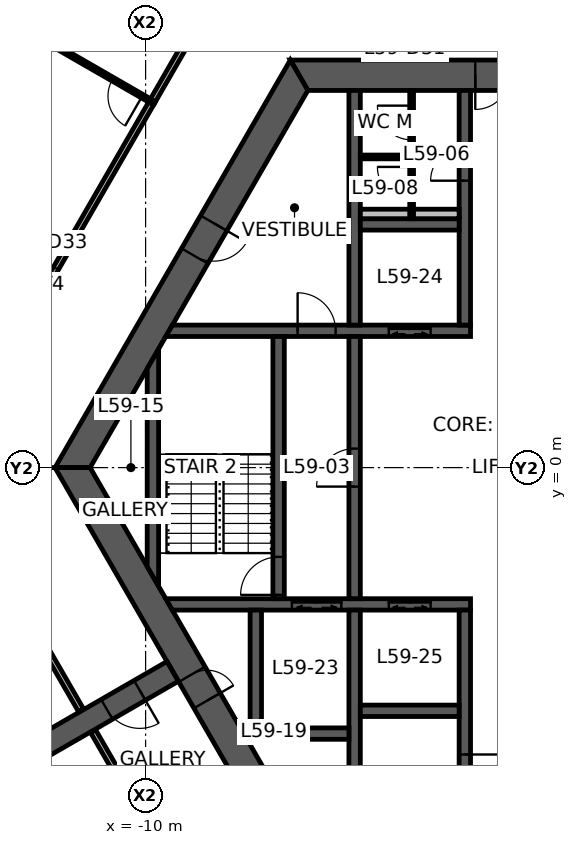
"""IFC4 building model, lengths in metres.
Left out: names, types, materials, properties, quantities, classifications, styles, units other than length and angle.
Written with IfcOpenShell. Run it as: python <this file> out.ifc"""

import sys

from ifc_helpers import new_model, si_unit, direction, frame, frame_2d, origin, place, context, subcontext, project, spatial, polyline, rectangle, outline, extrude, element, fill, save


model = new_model("IFC4")
c1 = context("Model", 3, precision=1e-05, world=origin(), true_north=direction((0.0, 1.0)))
c2 = subcontext(c1, "Body", "Model", "MODEL_VIEW")
j1 = project(units=[si_unit("LENGTHUNIT", "METRE"), si_unit("PLANEANGLEUNIT", "RADIAN")], contexts=[c1])
p1 = place(None, origin())
s1 = spatial("IfcSite", under=j1, at=p1, CompositionType="ELEMENT")
p2 = place(p1, origin())
s2 = spatial("IfcBuilding", under=s1, at=p2, CompositionType="ELEMENT")
p3 = place(p2, frame((0.0, 0.0, 236.2)))
s3 = spatial("IfcBuildingStorey", under=s2, at=p3, CompositionType="ELEMENT", Elevation=236.2)
p4 = place(p3, frame((5.961, 10.325, 0.0), z_axis=(0.0, 0.0, 1.0), x_axis=(-1.0, 0.0, 0.0)))
e1 = element("IfcWall", 1, at=p4, inside=s3, PredefinedType="SHEAR", context=c2, shape_type="SweptSolid", body=[
    extrude(outline(polyline([(-0.231, -0.4), (4.636, -0.4), (5.536, -0.4), (6.386, -0.4), (7.286, -0.4), (12.153, -0.4), (11.691, 0.4), (7.286, 0.4), (6.386, 0.4), (5.536, 0.4), (4.636, 0.4), (0.231, 0.4), (-0.231, -0.4)])), origin(), (0.0, 0.0, 1.0), 3.9),
])
p5 = place(p4, frame((6.386, 0.0, 0.0)))
e2 = element("IfcOpeningElement", 2, at=p5, cuts=e1, PredefinedType="OPENING", context=c2, shape_type="SweptSolid", body=[
    extrude(rectangle(XDim=0.9, YDim=2.1, at=frame_2d((0.45, 1.05))), frame((0.0, 0.41, 0.0), z_axis=(0.0, -1.0, 0.0), x_axis=(1.0, 0.0, 0.0)), (0.0, 0.0, 1.0), 0.82),
])
p6 = place(p4, frame((4.636, 0.0, 0.0)))
e3 = element("IfcOpeningElement", 3, at=p6, cuts=e1, PredefinedType="OPENING", context=c2, shape_type="SweptSolid", body=[
    extrude(rectangle(XDim=0.9, YDim=2.1, at=frame_2d((0.45, 1.05))), frame((0.0, 0.41, 0.0), z_axis=(0.0, -1.0, 0.0), x_axis=(1.0, 0.0, 0.0)), (0.0, 0.0, 1.0), 0.82),
])
p7 = place(p3, frame((-5.961, 10.325, 0.0), z_axis=(0.0, 0.0, 1.0), x_axis=(-0.500004296715, -0.866022923061, 0.0)))
e4 = element("IfcWall", 4, at=p7, inside=s3, PredefinedType="SHEAR", context=c2, shape_type="SweptSolid", body=[
    extrude(outline(polyline([(-0.231, -0.4), (4.494, -0.4), (5.494, -0.4), (12.153, -0.4), (11.691, 0.4), (5.494, 0.4), (4.494, 0.4), (0.231, 0.4), (-0.231, -0.4)])), origin(), (0.0, 0.0, 1.0), 3.9),
])
p8 = place(p7, frame((4.494, 0.0, 0.0)))
e5 = element("IfcOpeningElement", 5, at=p8, cuts=e4, PredefinedType="OPENING", context=c2, shape_type="SweptSolid", body=[
    extrude(rectangle(XDim=1.0, YDim=2.1, at=frame_2d((0.5, 1.05))), frame((0.0, 0.41, 0.0), z_axis=(0.0, -1.0, 0.0), x_axis=(1.0, 0.0, 0.0)), (0.0, 0.0, 1.0), 0.82),
])
p9 = place(p3, frame((-11.922, 0.0, 0.0), z_axis=(0.0, 0.0, 1.0), x_axis=(0.500004296715, -0.866022923061, 0.0)))
e6 = element("IfcWall", 6, at=p9, inside=s3, PredefinedType="SHEAR", context=c2, shape_type="SweptSolid", body=[
    extrude(outline(polyline([(-0.231, -0.4), (6.281, -0.4), (7.081, -0.4), (12.153, -0.4), (11.691, 0.4), (7.081, 0.4), (6.281, 0.4), (0.231, 0.4), (-0.231, -0.4)])), origin(), (0.0, 0.0, 1.0), 3.9),
])
p10 = place(p9, frame((6.281, 0.0, 0.0)))
e7 = element("IfcOpeningElement", 7, at=p10, cuts=e6, PredefinedType="OPENING", context=c2, shape_type="SweptSolid", body=[
    extrude(rectangle(XDim=0.8, YDim=2.1, at=frame_2d((0.4, 1.05))), frame((0.0, 0.41, 0.0), z_axis=(0.0, -1.0, 0.0), x_axis=(1.0, 0.0, 0.0)), (0.0, 0.0, 1.0), 0.82),
])
p11 = place(p3, frame((-9.288, -5.363, 0.0), z_axis=(0.0, 0.0, 1.0), x_axis=(-0.866027473358, -0.499996415376, 0.0)))
e8 = element("IfcWall", 8, at=p11, inside=s3, PredefinedType="SHEAR", context=c2, shape_type="SweptSolid", body=[
    extrude(rectangle(XDim=7.045, YDim=0.6, at=frame_2d((3.523, 0.0))), origin(), (0.0, 0.0, 1.0), 3.9),
])
p12 = place(p11, frame((1.0, 0.0, 0.0)))
e9 = element("IfcOpeningElement", 9, at=p12, cuts=e8, PredefinedType="OPENING", context=c2, shape_type="SweptSolid", body=[
    extrude(rectangle(XDim=1.0, YDim=2.1, at=frame_2d((0.5, 1.05))), frame((0.0, 0.31, 0.0), z_axis=(0.0, -1.0, 0.0), x_axis=(1.0, 0.0, 0.0)), (0.0, 0.0, 1.0), 0.62),
])
p13 = place(p3, frame((-9.382, 3.6, 0.0), z_axis=(0.0, 0.0, 1.0), x_axis=(1.0, 0.0, 0.0)))
e10 = element("IfcWall", 10, at=p13, inside=s3, PredefinedType="SHEAR", context=c2, shape_type="SweptSolid", body=[
    extrude(outline(polyline([(-0.087, -0.15), (3.382, -0.15), (4.382, -0.15), (5.782, -0.15), (6.882, -0.15), (7.932, -0.15), (7.932, 0.15), (6.882, 0.15), (5.782, 0.15), (4.382, 0.15), (3.382, 0.15), (0.087, 0.15), (-0.087, -0.15)])), origin(), (0.0, 0.0, 1.0), 3.9),
])
p14 = place(p13, frame((3.382, 0.0, 0.0)))
e11 = element("IfcOpeningElement", 11, at=p14, cuts=e10, PredefinedType="OPENING", context=c2, shape_type="SweptSolid", body=[
    extrude(rectangle(XDim=1.0, YDim=2.1, at=frame_2d((0.5, 1.05))), frame((0.0, 0.16, 0.0), z_axis=(0.0, -1.0, 0.0), x_axis=(1.0, 0.0, 0.0)), (0.0, 0.0, 1.0), 0.32),
])
p15 = place(p13, frame((5.782, 0.0, 0.0)))
e12 = element("IfcOpeningElement", 12, at=p15, cuts=e10, PredefinedType="OPENING", context=c2, shape_type="SweptSolid", body=[
    extrude(rectangle(XDim=1.1, YDim=2.1, at=frame_2d((0.55, 1.05))), frame((0.0, 0.16, 0.0), z_axis=(0.0, -1.0, 0.0), x_axis=(1.0, 0.0, 0.0)), (0.0, 0.0, 1.0), 0.32),
])
p16 = place(p3, frame((-9.382, -3.6, 0.0), z_axis=(0.0, 0.0, 1.0), x_axis=(1.0, 0.0, 0.0)))
e13 = element("IfcWall", 13, at=p16, inside=s3, PredefinedType="SHEAR", context=c2, shape_type="SweptSolid", body=[
    extrude(outline(polyline([(0.087, -0.15), (3.232, -0.15), (4.532, -0.15), (5.782, -0.15), (6.882, -0.15), (7.932, -0.15), (7.932, 0.15), (6.882, 0.15), (5.782, 0.15), (4.532, 0.15), (3.232, 0.15), (-0.087, 0.15), (0.087, -0.15)])), origin(), (0.0, 0.0, 1.0), 3.9),
])
p17 = place(p16, frame((5.782, 0.0, 0.0)))
e14 = element("IfcOpeningElement", 14, at=p17, cuts=e13, PredefinedType="OPENING", context=c2, shape_type="SweptSolid", body=[
    extrude(rectangle(XDim=1.1, YDim=2.1, at=frame_2d((0.55, 1.05))), frame((0.0, 0.16, 0.0), z_axis=(0.0, -1.0, 0.0), x_axis=(1.0, 0.0, 0.0)), (0.0, 0.0, 1.0), 0.32),
])
p18 = place(p16, frame((3.232, 0.0, 0.0)))
e15 = element("IfcOpeningElement", 15, at=p18, cuts=e13, PredefinedType="OPENING", context=c2, shape_type="SweptSolid", body=[
    extrude(rectangle(XDim=1.3, YDim=2.1, at=frame_2d((0.65, 1.05))), frame((0.0, 0.16, 0.0), z_axis=(0.0, -1.0, 0.0), x_axis=(1.0, 0.0, 0.0)), (0.0, 0.0, 1.0), 0.32),
])
p19 = place(p3, frame((-1.6, 3.75, 0.0), z_axis=(0.0, 0.0, 1.0), x_axis=(0.0, 1.0, 0.0)))
e16 = element("IfcWall", 16, at=p19, inside=s3, PredefinedType="SHEAR", context=c2, shape_type="SweptSolid", body=[
    extrude(rectangle(XDim=6.175, YDim=0.3, at=frame_2d((3.087, 0.0))), origin(), (0.0, 0.0, 1.0), 3.9),
])
p20 = place(p19, frame((3.8, 0.0, 0.0)))
e17 = element("IfcOpeningElement", 17, at=p20, cuts=e16, PredefinedType="OPENING", context=c2, shape_type="SweptSolid", body=[
    extrude(rectangle(XDim=0.9, YDim=2.1, at=frame_2d((0.45, 1.05))), frame((0.0, 0.16, 0.0), z_axis=(0.0, -1.0, 0.0), x_axis=(1.0, 0.0, 0.0)), (0.0, 0.0, 1.0), 0.32),
])
p21 = place(p3, frame((-1.6, -3.75, 0.0), z_axis=(0.0, 0.0, 1.0), x_axis=(0.0, -1.0, 0.0)))
e18 = element("IfcWall", 18, at=p21, inside=s3, PredefinedType="SHEAR", context=c2, shape_type="SweptSolid", body=[
    extrude(rectangle(XDim=6.175, YDim=0.3, at=frame_2d((3.087, 0.0))), origin(), (0.0, 0.0, 1.0), 3.9),
])
p22 = place(p21, frame((3.8, 0.0, 0.0)))
e19 = element("IfcOpeningElement", 19, at=p22, cuts=e18, PredefinedType="OPENING", context=c2, shape_type="SweptSolid", body=[
    extrude(rectangle(XDim=0.9, YDim=2.1, at=frame_2d((0.45, 1.05))), frame((0.0, 0.16, 0.0), z_axis=(0.0, -1.0, 0.0), x_axis=(1.0, 0.0, 0.0)), (0.0, 0.0, 1.0), 0.32),
])
p23 = place(p3, frame((-4.5, -3.45, 0.0), z_axis=(0.0, 0.0, 1.0), x_axis=(0.0, 1.0, 0.0)))
e20 = element("IfcWall", 20, at=p23, inside=s3, PredefinedType="SHEAR", context=c2, shape_type="SweptSolid", body=[
    extrude(rectangle(XDim=6.9, YDim=0.3, at=frame_2d((3.45, 0.0))), origin(), (0.0, 0.0, 1.0), 3.9),
])
p24 = place(p23, frame((2.95, 0.0, 0.0)))
e21 = element("IfcOpeningElement", 21, at=p24, cuts=e20, PredefinedType="OPENING", context=c2, shape_type="SweptSolid", body=[
    extrude(rectangle(XDim=1.0, YDim=2.1, at=frame_2d((0.5, 1.05))), frame((0.0, 0.16, 0.0), z_axis=(0.0, -1.0, 0.0), x_axis=(1.0, 0.0, 0.0)), (0.0, 0.0, 1.0), 0.32),
])
p25 = place(p3, frame((-6.5, -3.45, 0.0), z_axis=(0.0, 0.0, 1.0), x_axis=(0.0, 1.0, 0.0)))
e22 = element("IfcWall", 22, at=p25, inside=s3, PredefinedType="SHEAR", context=c2, shape_type="SweptSolid", body=[
    extrude(rectangle(XDim=6.9, YDim=0.3, at=frame_2d((3.45, 0.0))), origin(), (0.0, 0.0, 1.0), 3.9),
])
p26 = place(p25, frame((0.1, 0.0, 0.0)))
e23 = element("IfcOpeningElement", 23, at=p26, cuts=e22, PredefinedType="OPENING", context=c2, shape_type="SweptSolid", body=[
    extrude(rectangle(XDim=1.0, YDim=2.1, at=frame_2d((0.5, 1.05))), frame((0.0, 0.16, 0.0), z_axis=(0.0, -1.0, 0.0), x_axis=(1.0, 0.0, 0.0)), (0.0, 0.0, 1.0), 0.32),
])
for number, where, z_axis, x_axis in (
    (24, (-4.5, 3.75, 0.0), (0.0, 0.0, 1.0), (0.0, 1.0, 0.0)),
    (25, (-4.5, -3.75, 0.0), (0.0, 0.0, 1.0), (0.0, -1.0, 0.0)),
):
    element("IfcWall", number, at=place(p3, frame(where, z_axis=z_axis, x_axis=x_axis)), inside=s3, PredefinedType="SHEAR", context=c2, shape_type="SweptSolid", body=[
        extrude(rectangle(XDim=6.175, YDim=0.3, at=frame_2d((3.087, 0.0))), origin(), (0.0, 0.0, 1.0), 3.9),
    ])
for number, where, z_axis, x_axis in (
    (26, (-4.35, 6.4, 0.0), (0.0, 0.0, 1.0), (1.0, 0.0, 0.0)),
    (27, (-4.35, -6.4, 0.0), (0.0, 0.0, 1.0), (1.0, 0.0, 0.0)),
    (28, (-7.25, -7.0, 0.0), (0.0, 0.0, 1.0), (1.0, 0.0, 0.0)),
):
    element("IfcWall", number, at=place(p3, frame(where, z_axis=z_axis, x_axis=x_axis)), inside=s3, PredefinedType="SHEAR", context=c2, shape_type="SweptSolid", body=[
        extrude(rectangle(XDim=2.6, YDim=0.3, at=frame_2d((1.3, 0.0))), origin(), (0.0, 0.0, 1.0), 3.9),
    ])
p27 = place(p3, frame((-7.1, -3.75, 0.0), z_axis=(0.0, 0.0, 1.0), x_axis=(0.0, -1.0, 0.0)))
e29 = element("IfcWall", 29, at=p27, inside=s3, PredefinedType="SHEAR", context=c2, shape_type="SweptSolid", body=[
    extrude(rectangle(XDim=3.1, YDim=0.3, at=frame_2d((1.55, 0.0))), origin(), (0.0, 0.0, 1.0), 3.9),
])
p28 = place(p3, frame((-9.808, -2.862, 0.0), z_axis=(0.0, 0.0, 1.0), x_axis=(0.0, 1.0, 0.0)))
e30 = element("IfcWall", 30, at=p28, inside=s3, PredefinedType="SHEAR", context=c2, shape_type="SweptSolid", body=[
    extrude(outline(polyline([(-0.26, -0.15), (5.984, -0.15), (5.465, 0.15), (0.26, 0.15), (-0.26, -0.15)])), origin(), (0.0, 0.0, 1.0), 3.9),
])
p29 = place(p3, frame((-4.35, 6.675, 0.0), z_axis=(0.0, 0.0, 1.0), x_axis=(1.0, 0.0, 0.0)))
e31 = element("IfcWall", 31, at=p29, inside=s3, PredefinedType="PLUMBINGWALL", context=c2, shape_type="SweptSolid", body=[
    extrude(rectangle(XDim=2.6, YDim=0.25, at=frame_2d((1.3, 0.0))), origin(), (0.0, 0.0, 1.0), 3.9),
])
p30 = place(p3, frame((-3.0, 6.55, 0.0), z_axis=(0.0, 0.0, 1.0), x_axis=(0.0, 1.0, 0.0)))
e32 = element("IfcWall", 32, at=p30, inside=s3, PredefinedType="PARTITIONING", context=c2, shape_type="SweptSolid", body=[
    extrude(rectangle(XDim=3.375, YDim=0.1, at=frame_2d((1.688, 0.0))), origin(), (0.0, 0.0, 1.0), 2.95),
])
p31 = place(p30, frame((2.075, 0.0, 0.0)))
e33 = element("IfcOpeningElement", 33, at=p31, cuts=e32, PredefinedType="OPENING", context=c2, shape_type="SweptSolid", body=[
    extrude(rectangle(XDim=0.9, YDim=2.1, at=frame_2d((0.45, 1.05))), frame((0.0, 0.06, 0.0), z_axis=(0.0, -1.0, 0.0), x_axis=(1.0, 0.0, 0.0)), (0.0, 0.0, 1.0), 0.12),
])
p32 = place(p30, frame((0.462, 0.0, 0.0)))
e34 = element("IfcOpeningElement", 34, at=p32, cuts=e32, PredefinedType="OPENING", context=c2, shape_type="SweptSolid", body=[
    extrude(rectangle(XDim=0.9, YDim=2.1, at=frame_2d((0.45, 1.05))), frame((0.0, 0.06, 0.0), z_axis=(0.0, -1.0, 0.0), x_axis=(1.0, 0.0, 0.0)), (0.0, 0.0, 1.0), 0.12),
])
p33 = place(p3, frame((-3.05, 8.175, 0.0), z_axis=(0.0, 0.0, 1.0), x_axis=(-1.0, 0.0, 0.0)))
e35 = element("IfcWall", 35, at=p33, inside=s3, PredefinedType="PARTITIONING", context=c2, shape_type="SweptSolid", body=[
    extrude(rectangle(XDim=1.3, YDim=0.1, at=frame_2d((0.65, 0.0))), origin(), (0.0, 0.0, 1.0), 2.95),
])
p34 = place(p3, frame((-11.7, -6.385, 0.0), z_axis=(0.0, 0.0, 1.0), x_axis=(-0.500003537243, 0.866023361547, 0.0)))
e36 = element("IfcWall", 36, at=p34, inside=s3, PredefinedType="PARTITIONING", context=c2, shape_type="SweptSolid", body=[
    extrude(rectangle(XDim=6.516, YDim=0.15, at=frame_2d((3.258, 0.0))), origin(), (0.0, 0.0, 1.0), 2.95),
])
p35 = place(p3, frame((-9.835, 9.616, 0.0), z_axis=(0.0, 0.0, 1.0), x_axis=(0.500078009402, 0.86598036035, 0.0)))
e37 = element("IfcWall", 37, at=p35, inside=s3, PredefinedType="PARTITIONING", context=c2, shape_type="SweptSolid", body=[
    extrude(rectangle(XDim=4.26, YDim=0.15, at=frame_2d((2.13, 0.0))), origin(), (0.0, 0.0, 1.0), 2.95),
])
p36 = place(p3, frame((-15.386, 0.0, 0.0), z_axis=(0.0, 0.0, 1.0), x_axis=(0.50000453164, 0.866022787425, 0.0)))
e38 = element("IfcWall", 38, at=p36, inside=s3, PredefinedType="PARTITIONING", context=c2, shape_type="SweptSolid", body=[
    extrude(rectangle(XDim=11.113, YDim=0.15, at=frame_2d((5.557, 0.0))), origin(), (0.0, 0.0, 1.0), 2.95),
])
p37 = place(p36, frame((5.057, 0.0, 0.0)))
e39 = element("IfcOpeningElement", 39, at=p37, cuts=e38, PredefinedType="OPENING", context=c2, shape_type="SweptSolid", body=[
    extrude(rectangle(XDim=1.0, YDim=2.1, at=frame_2d((0.5, 1.05))), frame((0.0, 0.085, 0.0), z_axis=(0.0, -1.0, 0.0), x_axis=(1.0, 0.0, 0.0)), (0.0, 0.0, 1.0), 0.17),
])
p38 = place(p3, frame((-9.83, 9.624, 0.0), z_axis=(0.0, 0.0, 1.0), x_axis=(-0.866527293697, 0.499129691842, 0.0)))
e40 = element("IfcWall", 40, at=p38, inside=s3, PredefinedType="PARTITIONING", context=c2, shape_type="SweptSolid", body=[
    extrude(rectangle(XDim=4.505, YDim=0.1, at=frame_2d((2.253, 0.0))), origin(), (0.0, 0.0, 1.0), 2.95),
])
p39 = place(p38, frame((0.3, 0.0, 0.0)))
e41 = element("IfcOpeningElement", 41, at=p39, cuts=e40, PredefinedType="OPENING", context=c2, shape_type="SweptSolid", body=[
    extrude(rectangle(XDim=0.9, YDim=2.1, at=frame_2d((0.45, 1.05))), frame((0.0, 0.06, 0.0), z_axis=(0.0, -1.0, 0.0), x_axis=(1.0, 0.0, 0.0)), (0.0, 0.0, 1.0), 0.12),
])
p40 = place(p3, frame((-10.738, -8.052, 0.0), z_axis=(0.0, 0.0, 1.0), x_axis=(-0.500084415177, 0.865976661173, 0.0)))
e42 = element("IfcWall", 42, at=p40, inside=s3, PredefinedType="PARTITIONING", context=c2, shape_type="SweptSolid", body=[
    extrude(rectangle(XDim=1.284, YDim=0.15, at=frame_2d((0.642, 0.0))), origin(), (0.0, 0.0, 1.0), 2.95),
])
p41 = place(p5, origin())
e43 = element("IfcDoor", 43, at=p41, inside=s3, OperationType="SINGLE_SWING_RIGHT", PredefinedType="DOOR", context=c2, shape_type="SweptSolid", body=[
    extrude(rectangle(XDim=0.9, YDim=2.1, at=frame_2d((0.45, 1.05))), frame((0.0, 0.025, 0.0), z_axis=(0.0, -1.0, 0.0), x_axis=(1.0, 0.0, 0.0)), (0.0, 0.0, 1.0), 0.05),
])
fill(e2, e43)
p42 = place(p10, origin())
e44 = element("IfcDoor", 44, at=p42, inside=s3, OperationType="SINGLE_SWING_RIGHT", PredefinedType="DOOR", context=c2, shape_type="SweptSolid", body=[
    extrude(rectangle(XDim=0.8, YDim=2.1, at=frame_2d((0.4, 1.05))), frame((0.0, 0.025, 0.0), z_axis=(0.0, -1.0, 0.0), x_axis=(1.0, 0.0, 0.0)), (0.0, 0.0, 1.0), 0.05),
])
fill(e7, e44)
p43 = place(p8, origin())
e45 = element("IfcDoor", 45, at=p43, inside=s3, OperationType="SINGLE_SWING_LEFT", PredefinedType="DOOR", context=c2, shape_type="SweptSolid", body=[
    extrude(rectangle(XDim=1.0, YDim=2.1, at=frame_2d((0.5, 1.05))), frame((0.0, 0.025, 0.0), z_axis=(0.0, -1.0, 0.0), x_axis=(1.0, 0.0, 0.0)), (0.0, 0.0, 1.0), 0.05),
])
fill(e5, e45)
p44 = place(p24, origin())
e46 = element("IfcDoor", 46, at=p44, inside=s3, OperationType="SINGLE_SWING_LEFT", PredefinedType="DOOR", context=c2, shape_type="SweptSolid", body=[
    extrude(rectangle(XDim=1.0, YDim=2.1, at=frame_2d((0.5, 1.05))), frame((0.0, 0.025, 0.0), z_axis=(0.0, -1.0, 0.0), x_axis=(1.0, 0.0, 0.0)), (0.0, 0.0, 1.0), 0.05),
])
fill(e21, e46)
p45 = place(p26, origin())
e47 = element("IfcDoor", 47, at=p45, inside=s3, OperationType="SINGLE_SWING_LEFT", PredefinedType="DOOR", context=c2, shape_type="SweptSolid", body=[
    extrude(rectangle(XDim=1.0, YDim=2.1, at=frame_2d((0.5, 1.05))), frame((0.0, 0.025, 0.0), z_axis=(0.0, -1.0, 0.0), x_axis=(1.0, 0.0, 0.0)), (0.0, 0.0, 1.0), 0.05),
])
fill(e23, e47)
p46 = place(p14, origin())
e48 = element("IfcDoor", 48, at=p46, inside=s3, OperationType="SINGLE_SWING_LEFT", PredefinedType="DOOR", context=c2, shape_type="SweptSolid", body=[
    extrude(rectangle(XDim=1.0, YDim=2.1, at=frame_2d((0.5, 1.05))), frame((0.0, 0.025, 0.0), z_axis=(0.0, -1.0, 0.0), x_axis=(1.0, 0.0, 0.0)), (0.0, 0.0, 1.0), 0.05),
])
fill(e11, e48)
p47 = place(p20, origin())
e49 = element("IfcDoor", 49, at=p47, inside=s3, OperationType="SINGLE_SWING_LEFT", PredefinedType="DOOR", context=c2, shape_type="SweptSolid", body=[
    extrude(rectangle(XDim=0.9, YDim=2.1, at=frame_2d((0.45, 1.05))), frame((0.0, 0.025, 0.0), z_axis=(0.0, -1.0, 0.0), x_axis=(1.0, 0.0, 0.0)), (0.0, 0.0, 1.0), 0.05),
])
fill(e17, e49)
p48 = place(p22, origin())
e50 = element("IfcDoor", 50, at=p48, inside=s3, OperationType="SINGLE_SWING_LEFT", PredefinedType="DOOR", context=c2, shape_type="SweptSolid", body=[
    extrude(rectangle(XDim=0.9, YDim=2.1, at=frame_2d((0.45, 1.05))), frame((0.0, 0.025, 0.0), z_axis=(0.0, -1.0, 0.0), x_axis=(1.0, 0.0, 0.0)), (0.0, 0.0, 1.0), 0.05),
])
fill(e19, e50)
p49 = place(p12, origin())
e51 = element("IfcDoor", 51, at=p49, inside=s3, OperationType="SINGLE_SWING_LEFT", PredefinedType="DOOR", context=c2, shape_type="SweptSolid", body=[
    extrude(rectangle(XDim=1.0, YDim=2.1, at=frame_2d((0.5, 1.05))), frame((0.0, 0.025, 0.0), z_axis=(0.0, -1.0, 0.0), x_axis=(1.0, 0.0, 0.0)), (0.0, 0.0, 1.0), 0.05),
])
fill(e9, e51)
p50 = place(p31, origin())
e52 = element("IfcDoor", 52, at=p50, inside=s3, OperationType="SINGLE_SWING_RIGHT", PredefinedType="DOOR", context=c2, shape_type="SweptSolid", body=[
    extrude(rectangle(XDim=0.9, YDim=2.1, at=frame_2d((0.45, 1.05))), frame((0.0, 0.025, 0.0), z_axis=(0.0, -1.0, 0.0), x_axis=(1.0, 0.0, 0.0)), (0.0, 0.0, 1.0), 0.05),
])
fill(e33, e52)
p51 = place(p32, origin())
e53 = element("IfcDoor", 53, at=p51, inside=s3, OperationType="SINGLE_SWING_RIGHT", PredefinedType="DOOR", context=c2, shape_type="SweptSolid", body=[
    extrude(rectangle(XDim=0.9, YDim=2.1, at=frame_2d((0.45, 1.05))), frame((0.0, 0.025, 0.0), z_axis=(0.0, -1.0, 0.0), x_axis=(1.0, 0.0, 0.0)), (0.0, 0.0, 1.0), 0.05),
])
fill(e34, e53)
p52 = place(p37, origin())
e54 = element("IfcDoor", 54, at=p52, inside=s3, OperationType="SINGLE_SWING_LEFT", PredefinedType="DOOR", context=c2, shape_type="SweptSolid", body=[
    extrude(rectangle(XDim=1.0, YDim=2.1, at=frame_2d((0.5, 1.05))), frame((0.0, 0.025, 0.0), z_axis=(0.0, -1.0, 0.0), x_axis=(1.0, 0.0, 0.0)), (0.0, 0.0, 1.0), 0.05),
])
fill(e39, e54)
p53 = place(p39, origin())
e55 = element("IfcDoor", 55, at=p53, inside=s3, OperationType="SINGLE_SWING_LEFT", PredefinedType="DOOR", context=c2, shape_type="SweptSolid", body=[
    extrude(rectangle(XDim=0.9, YDim=2.1, at=frame_2d((0.45, 1.05))), frame((0.0, 0.025, 0.0), z_axis=(0.0, -1.0, 0.0), x_axis=(1.0, 0.0, 0.0)), (0.0, 0.0, 1.0), 0.05),
])
fill(e41, e55)
p54 = place(p15, origin())
e56 = element("IfcDoor", 56, at=p54, inside=s3, OperationType="DOUBLE_DOOR_SLIDING", PredefinedType="DOOR", context=c2, shape_type="SweptSolid", body=[
    extrude(rectangle(XDim=1.1, YDim=2.1, at=frame_2d((0.55, 1.05))), frame((0.0, 0.025, 0.0), z_axis=(0.0, -1.0, 0.0), x_axis=(1.0, 0.0, 0.0)), (0.0, 0.0, 1.0), 0.05),
])
fill(e12, e56)
p55 = place(p17, origin())
e57 = element("IfcDoor", 57, at=p55, inside=s3, OperationType="DOUBLE_DOOR_SLIDING", PredefinedType="DOOR", context=c2, shape_type="SweptSolid", body=[
    extrude(rectangle(XDim=1.1, YDim=2.1, at=frame_2d((0.55, 1.05))), frame((0.0, 0.025, 0.0), z_axis=(0.0, -1.0, 0.0), x_axis=(1.0, 0.0, 0.0)), (0.0, 0.0, 1.0), 0.05),
])
fill(e14, e57)
p56 = place(p18, origin())
e58 = element("IfcDoor", 58, at=p56, inside=s3, OperationType="DOUBLE_DOOR_SLIDING", PredefinedType="DOOR", context=c2, shape_type="SweptSolid", body=[
    extrude(rectangle(XDim=1.3, YDim=2.1, at=frame_2d((0.65, 1.05))), frame((0.0, 0.025, 0.0), z_axis=(0.0, -1.0, 0.0), x_axis=(1.0, 0.0, 0.0)), (0.0, 0.0, 1.0), 0.05),
])
fill(e15, e58)
save(model, sys.argv[1])
